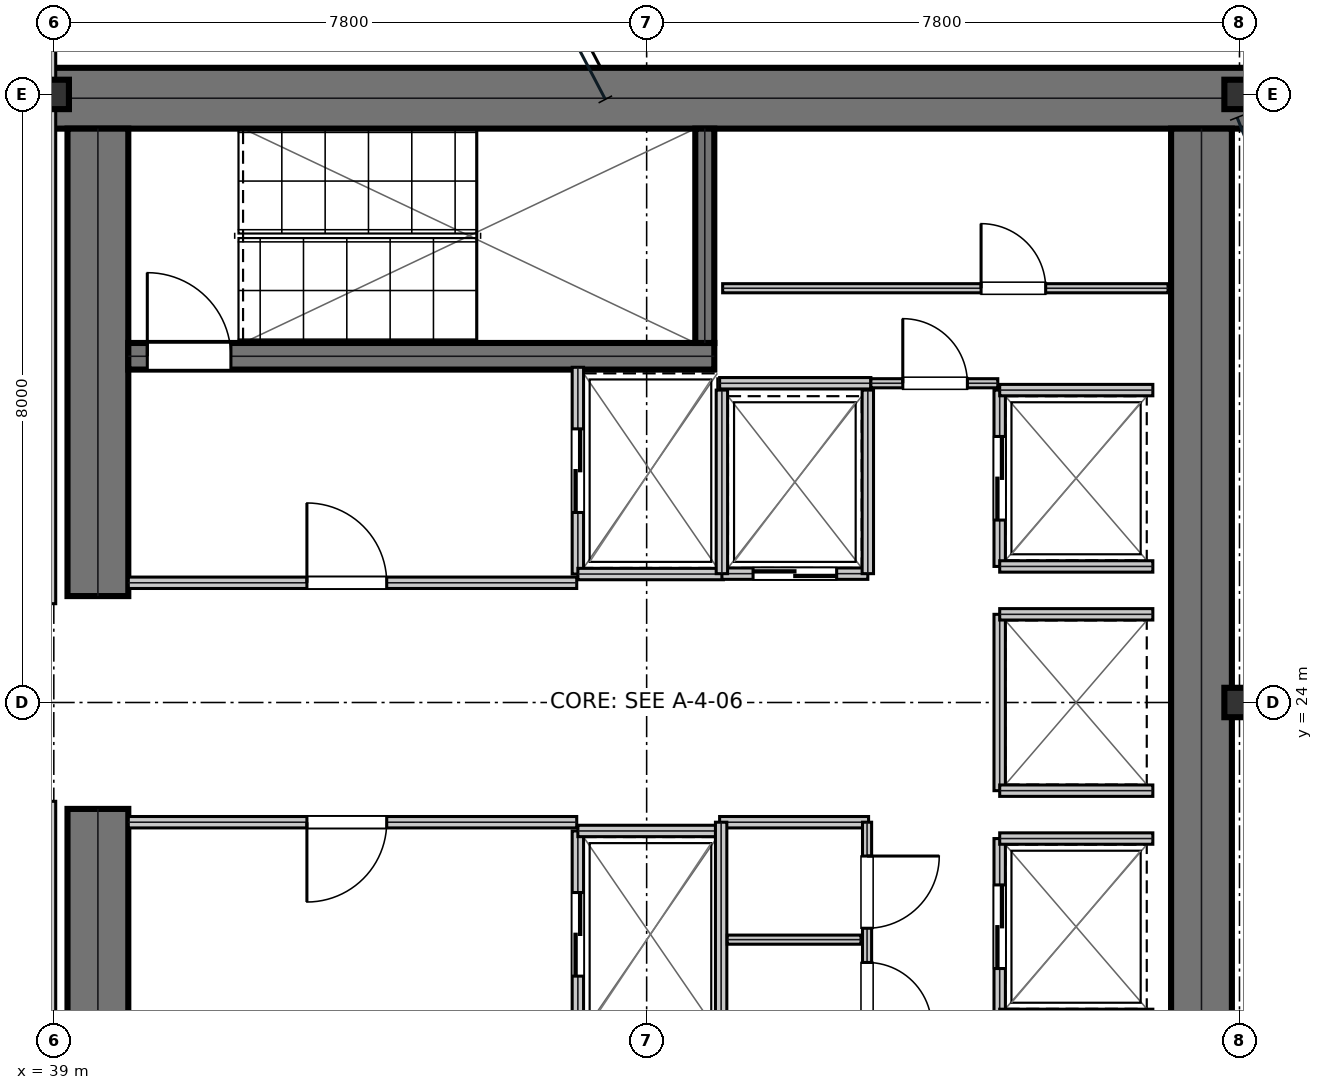
"""IFC4 building model, lengths in metres.
Left out: names, types, materials, properties, quantities, classifications, styles, units other than length and angle.
Written with IfcOpenShell. Run it as: python <this file> out.ifc"""

import sys

from ifc_helpers import new_model, si_unit, direction, frame, frame_2d, origin, origin_2d, place, context, subcontext, project, spatial, rectangle, i_section, extrude, element, fill, save


model = new_model("IFC4")
c1 = context("Model", 3, precision=1e-05, world=origin(), true_north=direction((0.0, 1.0)))
c2 = subcontext(c1, "Body", "Model", "MODEL_VIEW")
j1 = project(units=[si_unit("LENGTHUNIT", "METRE"), si_unit("PLANEANGLEUNIT", "RADIAN")], contexts=[c1])
p1 = place(None, origin())
s1 = spatial("IfcSite", under=j1, at=p1, CompositionType="ELEMENT")
p2 = place(p1, origin())
s2 = spatial("IfcBuilding", under=s1, at=p2, CompositionType="ELEMENT")
p3 = place(p2, frame((0.0, 0.0, 141.15)))
s3 = spatial("IfcBuildingStorey", under=s2, at=p3, CompositionType="ELEMENT", Elevation=141.15)
p4 = place(p3, frame((38.8, 31.95, 0.0), z_axis=(0.0, 0.0, 1.0), x_axis=(1.0, 0.0, 0.0)))
e1 = element("IfcWall", 1, at=p4, inside=s3, PredefinedType="SHEAR", context=c2, shape_type="SweptSolid", body=[
    extrude(rectangle(XDim=16.0, YDim=0.8, at=frame_2d((8.0, 0.0))), origin(), (0.0, 0.0, 1.0), 3.81),
])
for number, where, z_axis, x_axis in (
    (2, (39.58, 16.45, 0.0), (0.0, 0.0, 1.0), (0.0, 1.0, 0.0)),
    (3, (39.58, 25.4, 0.0), (0.0, 0.0, 1.0), (0.0, 1.0, 0.0)),
):
    element("IfcWall", number, at=place(p3, frame(where, z_axis=z_axis, x_axis=x_axis)), inside=s3, PredefinedType="SHEAR", context=c2, shape_type="SweptSolid", body=[
        extrude(rectangle(XDim=6.15, YDim=0.8, at=frame_2d((3.075, 0.0))), origin(), (0.0, 0.0, 1.0), 3.81),
    ])
p5 = place(p3, frame((54.1, 16.45, 0.0), z_axis=(0.0, 0.0, 1.0), x_axis=(0.0, 1.0, 0.0)))
e4 = element("IfcWall", 4, at=p5, inside=s3, PredefinedType="SHEAR", context=c2, shape_type="SweptSolid", body=[
    extrude(rectangle(XDim=15.1, YDim=0.8, at=frame_2d((7.55, 0.0))), origin(), (0.0, 0.0, 1.0), 3.81),
])
p6 = place(p3, frame((39.98, 28.555, 0.0), z_axis=(0.0, 0.0, 1.0), x_axis=(1.0, 0.0, 0.0)))
e5 = element("IfcWall", 5, at=p6, inside=s3, PredefinedType="SHEAR", context=c2, shape_type="SweptSolid", body=[
    extrude(rectangle(XDim=7.71, YDim=0.35, at=frame_2d((3.855, 0.0))), origin(), (0.0, 0.0, 1.0), 3.81),
])
p7 = place(p6, frame((0.25, 0.0, 0.0)))
e6 = element("IfcOpeningElement", 6, at=p7, cuts=e5, PredefinedType="OPENING", context=c2, shape_type="SweptSolid", body=[
    extrude(rectangle(XDim=1.1, YDim=2.15, at=frame_2d((0.55, 1.075))), frame((0.0, 0.185, 0.0), z_axis=(0.0, -1.0, 0.0), x_axis=(1.0, 0.0, 0.0)), (0.0, 0.0, 1.0), 0.37),
])
p8 = place(p3, frame((47.565, 28.73, 0.0), z_axis=(0.0, 0.0, 1.0), x_axis=(0.0, 1.0, 0.0)))
e7 = element("IfcWall", 7, at=p8, inside=s3, PredefinedType="SHEAR", context=c2, shape_type="SweptSolid", body=[
    extrude(rectangle(XDim=2.82, YDim=0.25, at=frame_2d((1.41, 0.0))), origin(), (0.0, 0.0, 1.0), 3.81),
])
for number, where, z_axis, x_axis in (
    (8, (39.0, 32.0, 0.0), (0.0, 0.0, 1.0), (1.0, 0.0, 0.0)),
    (9, (54.6, 24.0, 0.0), (0.0, 0.0, 1.0), (1.0, 0.0, 0.0)),
    (10, (54.6, 32.0, 0.0), (0.0, 0.0, 1.0), (1.0, 0.0, 0.0)),
):
    element("IfcColumn", number, at=place(p3, frame(where, z_axis=z_axis, x_axis=x_axis)), inside=s3, PredefinedType="COLUMN", context=c2, shape_type="SweptSolid", body=[
        extrude(i_section(OverallWidth=0.398, OverallDepth=0.387, WebThickness=0.021, FlangeThickness=0.033, at=origin_2d()), origin(), (0.0, 0.0, 1.0), 4.044),
    ])
p9 = place(p3, frame((39.98, 25.575, 0.0), z_axis=(0.0, 0.0, 1.0), x_axis=(1.0, 0.0, 0.0)))
e11 = element("IfcWall", 11, at=p9, inside=s3, PredefinedType="PARTITIONING", context=c2, shape_type="SweptSolid", body=[
    extrude(rectangle(XDim=5.9, YDim=0.15, at=frame_2d((2.95, 0.0))), origin(), (0.0, 0.0, 1.0), 3.81),
])
p10 = place(p9, frame((2.35, 0.0, 0.0)))
e12 = element("IfcOpeningElement", 12, at=p10, cuts=e11, PredefinedType="OPENING", context=c2, shape_type="SweptSolid", body=[
    extrude(rectangle(XDim=1.05, YDim=2.15, at=frame_2d((0.525, 1.075))), frame((0.0, 0.085, 0.0), z_axis=(0.0, -1.0, 0.0), x_axis=(1.0, 0.0, 0.0)), (0.0, 0.0, 1.0), 0.17),
])
p11 = place(p3, frame((39.98, 22.425, 0.0), z_axis=(0.0, 0.0, 1.0), x_axis=(1.0, 0.0, 0.0)))
e13 = element("IfcWall", 13, at=p11, inside=s3, PredefinedType="PARTITIONING", context=c2, shape_type="SweptSolid", body=[
    extrude(rectangle(XDim=5.9, YDim=0.15, at=frame_2d((2.95, 0.0))), origin(), (0.0, 0.0, 1.0), 3.81),
])
p12 = place(p11, frame((2.35, 0.0, 0.0)))
e14 = element("IfcOpeningElement", 14, at=p12, cuts=e13, PredefinedType="OPENING", context=c2, shape_type="SweptSolid", body=[
    extrude(rectangle(XDim=1.05, YDim=2.15, at=frame_2d((0.525, 1.075))), frame((0.0, 0.085, 0.0), z_axis=(0.0, -1.0, 0.0), x_axis=(1.0, 0.0, 0.0)), (0.0, 0.0, 1.0), 0.17),
])
p13 = place(p3, frame((45.895, 25.69, 0.0), z_axis=(0.0, 0.0, 1.0), x_axis=(0.0, 1.0, 0.0)))
e15 = element("IfcWall", 15, at=p13, inside=s3, PredefinedType="PARTITIONING", context=c2, shape_type="SweptSolid", body=[
    extrude(rectangle(XDim=2.72, YDim=0.15, at=frame_2d((1.36, 0.0))), origin(), (0.0, 0.0, 1.0), 3.81),
])
p14 = place(p13, frame((0.81, 0.0, 0.0)))
e16 = element("IfcOpeningElement", 16, at=p14, cuts=e15, PredefinedType="OPENING", context=c2, shape_type="SweptSolid", body=[
    extrude(rectangle(XDim=1.1, YDim=2.15, at=frame_2d((0.55, 1.075))), frame((0.0, 0.085, 0.0), z_axis=(0.0, -1.0, 0.0), x_axis=(1.0, 0.0, 0.0)), (0.0, 0.0, 1.0), 0.17),
])
p15 = place(p3, frame((45.895, 25.69, 0.0), z_axis=(0.0, 0.0, 1.0), x_axis=(1.0, 0.0, 0.0)))
e17 = element("IfcWall", 17, at=p15, inside=s3, PredefinedType="PARTITIONING", context=c2, shape_type="SweptSolid", body=[
    extrude(rectangle(XDim=1.915, YDim=0.15, at=frame_2d((0.958, 0.0))), origin(), (0.0, 0.0, 1.0), 3.81),
])
p16 = place(p3, frame((45.895, 19.59, 0.0), z_axis=(0.0, 0.0, 1.0), x_axis=(0.0, 1.0, 0.0)))
e18 = element("IfcWall", 18, at=p16, inside=s3, PredefinedType="PARTITIONING", context=c2, shape_type="SweptSolid", body=[
    extrude(rectangle(XDim=2.72, YDim=0.15, at=frame_2d((1.36, 0.0))), origin(), (0.0, 0.0, 1.0), 3.81),
])
p17 = place(p16, frame((0.81, 0.0, 0.0)))
e19 = element("IfcOpeningElement", 19, at=p17, cuts=e18, PredefinedType="OPENING", context=c2, shape_type="SweptSolid", body=[
    extrude(rectangle(XDim=1.1, YDim=2.15, at=frame_2d((0.55, 1.075))), frame((0.0, 0.085, 0.0), z_axis=(0.0, -1.0, 0.0), x_axis=(1.0, 0.0, 0.0)), (0.0, 0.0, 1.0), 0.17),
])
p18 = place(p3, frame((45.895, 22.31, 0.0), z_axis=(0.0, 0.0, 1.0), x_axis=(1.0, 0.0, 0.0)))
e20 = element("IfcWall", 20, at=p18, inside=s3, PredefinedType="PARTITIONING", context=c2, shape_type="SweptSolid", body=[
    extrude(rectangle(XDim=1.915, YDim=0.15, at=frame_2d((0.958, 0.0))), origin(), (0.0, 0.0, 1.0), 3.81),
])
p19 = place(p3, frame((47.79, 25.695, 0.0), z_axis=(0.0, 0.0, 1.0), x_axis=(1.0, 0.0, 0.0)))
e21 = element("IfcWall", 21, at=p19, inside=s3, PredefinedType="PARTITIONING", context=c2, shape_type="SweptSolid", body=[
    extrude(rectangle(XDim=1.92, YDim=0.15, at=frame_2d((0.96, 0.0))), origin(), (0.0, 0.0, 1.0), 3.81),
])
p20 = place(p19, frame((0.41, 0.0, 0.0)))
e22 = element("IfcOpeningElement", 22, at=p20, cuts=e21, PredefinedType="OPENING", context=c2, shape_type="SweptSolid", body=[
    extrude(rectangle(XDim=1.1, YDim=2.15, at=frame_2d((0.55, 1.075))), frame((0.0, 0.085, 0.0), z_axis=(0.0, -1.0, 0.0), x_axis=(1.0, 0.0, 0.0)), (0.0, 0.0, 1.0), 0.17),
])
for number, where, z_axis, x_axis in (
    (23, (47.79, 25.695, 0.0), (0.0, 0.0, 1.0), (0.0, 1.0, 0.0)),
    (24, (49.71, 25.695, 0.0), (0.0, 0.0, 1.0), (0.0, 1.0, 0.0)),
):
    element("IfcWall", number, at=place(p3, frame(where, z_axis=z_axis, x_axis=x_axis)), inside=s3, PredefinedType="PARTITIONING", context=c2, shape_type="SweptSolid", body=[
        extrude(rectangle(XDim=2.415, YDim=0.15, at=frame_2d((1.208, 0.0))), origin(), (0.0, 0.0, 1.0), 3.81),
    ])
p21 = place(p3, frame((51.445, 25.79, 0.0), z_axis=(0.0, 0.0, 1.0), x_axis=(0.0, 1.0, 0.0)))
e25 = element("IfcWall", 25, at=p21, inside=s3, PredefinedType="PARTITIONING", context=c2, shape_type="SweptSolid", body=[
    extrude(rectangle(XDim=2.32, YDim=0.15, at=frame_2d((1.16, 0.0))), origin(), (0.0, 0.0, 1.0), 3.81),
])
p22 = place(p21, frame((0.61, 0.0, 0.0)))
e26 = element("IfcOpeningElement", 26, at=p22, cuts=e25, PredefinedType="OPENING", context=c2, shape_type="SweptSolid", body=[
    extrude(rectangle(XDim=1.1, YDim=2.15, at=frame_2d((0.55, 1.075))), frame((0.0, 0.085, 0.0), z_axis=(0.0, -1.0, 0.0), x_axis=(1.0, 0.0, 0.0)), (0.0, 0.0, 1.0), 0.17),
])
for number, where, z_axis, x_axis in (
    (27, (51.445, 25.79, 0.0), (0.0, 0.0, 1.0), (1.0, 0.0, 0.0)),
    (28, (51.445, 28.11, 0.0), (0.0, 0.0, 1.0), (1.0, 0.0, 0.0)),
):
    element("IfcWall", number, at=place(p3, frame(where, z_axis=z_axis, x_axis=x_axis)), inside=s3, PredefinedType="PARTITIONING", context=c2, shape_type="SweptSolid", body=[
        extrude(rectangle(XDim=2.015, YDim=0.15, at=frame_2d((1.007, 0.0))), origin(), (0.0, 0.0, 1.0), 3.81),
    ])
p23 = place(p3, frame((51.445, 19.89, 0.0), z_axis=(0.0, 0.0, 1.0), x_axis=(0.0, 1.0, 0.0)))
e29 = element("IfcWall", 29, at=p23, inside=s3, PredefinedType="PARTITIONING", context=c2, shape_type="SweptSolid", body=[
    extrude(rectangle(XDim=2.32, YDim=0.15, at=frame_2d((1.16, 0.0))), origin(), (0.0, 0.0, 1.0), 3.81),
])
p24 = place(p23, frame((0.61, 0.0, 0.0)))
e30 = element("IfcOpeningElement", 30, at=p24, cuts=e29, PredefinedType="OPENING", context=c2, shape_type="SweptSolid", body=[
    extrude(rectangle(XDim=1.1, YDim=2.15, at=frame_2d((0.55, 1.075))), frame((0.0, 0.085, 0.0), z_axis=(0.0, -1.0, 0.0), x_axis=(1.0, 0.0, 0.0)), (0.0, 0.0, 1.0), 0.17),
])
for number, where, z_axis, x_axis in (
    (31, (51.445, 19.89, 0.0), (0.0, 0.0, 1.0), (1.0, 0.0, 0.0)),
    (32, (51.445, 22.21, 0.0), (0.0, 0.0, 1.0), (1.0, 0.0, 0.0)),
):
    element("IfcWall", number, at=place(p3, frame(where, z_axis=z_axis, x_axis=x_axis)), inside=s3, PredefinedType="PARTITIONING", context=c2, shape_type="SweptSolid", body=[
        extrude(rectangle(XDim=2.015, YDim=0.15, at=frame_2d((1.007, 0.0))), origin(), (0.0, 0.0, 1.0), 3.81),
    ])
p25 = place(p3, frame((51.445, 22.84, 0.0), z_axis=(0.0, 0.0, 1.0), x_axis=(0.0, 1.0, 0.0)))
e33 = element("IfcWall", 33, at=p25, inside=s3, PredefinedType="PARTITIONING", context=c2, shape_type="SweptSolid", body=[
    extrude(rectangle(XDim=2.32, YDim=0.15, at=frame_2d((1.16, 0.0))), origin(), (0.0, 0.0, 1.0), 3.81),
])
for number, where, z_axis, x_axis in (
    (34, (51.445, 22.84, 0.0), (0.0, 0.0, 1.0), (1.0, 0.0, 0.0)),
    (35, (51.445, 25.16, 0.0), (0.0, 0.0, 1.0), (1.0, 0.0, 0.0)),
):
    element("IfcWall", number, at=place(p3, frame(where, z_axis=z_axis, x_axis=x_axis)), inside=s3, PredefinedType="PARTITIONING", context=c2, shape_type="SweptSolid", body=[
        extrude(rectangle(XDim=2.015, YDim=0.15, at=frame_2d((1.007, 0.0))), origin(), (0.0, 0.0, 1.0), 3.81),
    ])
p26 = place(p3, frame((47.76, 22.425, 0.0), z_axis=(0.0, 0.0, 1.0), x_axis=(1.0, 0.0, 0.0)))
e36 = element("IfcWall", 36, at=p26, inside=s3, PredefinedType="PARTITIONING", context=c2, shape_type="SweptSolid", body=[
    extrude(rectangle(XDim=1.96, YDim=0.15, at=frame_2d((0.98, 0.0))), origin(), (0.0, 0.0, 1.0), 3.81),
])
p27 = place(p3, frame((47.78, 16.45, 0.0), z_axis=(0.0, 0.0, 1.0), x_axis=(0.0, 1.0, 0.0)))
e37 = element("IfcWall", 37, at=p27, inside=s3, PredefinedType="PARTITIONING", context=c2, shape_type="SweptSolid", body=[
    extrude(rectangle(XDim=5.975, YDim=0.15, at=frame_2d((2.988, 0.0))), origin(), (0.0, 0.0, 1.0), 3.81),
])
p28 = place(p3, frame((47.86, 20.88, 0.0), z_axis=(0.0, 0.0, 1.0), x_axis=(1.0, 0.0, 0.0)))
e38 = element("IfcWall", 38, at=p28, inside=s3, PredefinedType="PARTITIONING", context=c2, shape_type="SweptSolid", body=[
    extrude(rectangle(XDim=1.76, YDim=0.12, at=frame_2d((0.88, 0.0))), origin(), (0.0, 0.0, 1.0), 3.81),
])
p29 = place(p3, frame((49.7, 16.48, 0.0), z_axis=(0.0, 0.0, 1.0), x_axis=(0.0, 1.0, 0.0)))
e39 = element("IfcWall", 39, at=p29, inside=s3, PredefinedType="PARTITIONING", context=c2, shape_type="SweptSolid", body=[
    extrude(rectangle(XDim=5.945, YDim=0.12, at=frame_2d((2.973, 0.0))), origin(), (0.0, 0.0, 1.0), 3.81),
])
p30 = place(p29, frame((1.6, 0.0, 0.0)))
e40 = element("IfcOpeningElement", 40, at=p30, cuts=e39, PredefinedType="OPENING", context=c2, shape_type="SweptSolid", body=[
    extrude(rectangle(XDim=0.85, YDim=2.15, at=frame_2d((0.425, 1.075))), frame((0.0, 0.07, 0.0), z_axis=(0.0, -1.0, 0.0), x_axis=(1.0, 0.0, 0.0)), (0.0, 0.0, 1.0), 0.14),
])
p31 = place(p29, frame((3.25, 0.0, 0.0)))
e41 = element("IfcOpeningElement", 41, at=p31, cuts=e39, PredefinedType="OPENING", context=c2, shape_type="SweptSolid", body=[
    extrude(rectangle(XDim=0.85, YDim=2.15, at=frame_2d((0.425, 1.075))), frame((0.0, 0.07, 0.0), z_axis=(0.0, -1.0, 0.0), x_axis=(1.0, 0.0, 0.0)), (0.0, 0.0, 1.0), 0.14),
])
p32 = place(p29, frame((4.55, 0.0, 0.0)))
e42 = element("IfcOpeningElement", 42, at=p32, cuts=e39, PredefinedType="OPENING", context=c2, shape_type="SweptSolid", body=[
    extrude(rectangle(XDim=0.95, YDim=2.15, at=frame_2d((0.475, 1.075))), frame((0.0, 0.07, 0.0), z_axis=(0.0, -1.0, 0.0), x_axis=(1.0, 0.0, 0.0)), (0.0, 0.0, 1.0), 0.14),
])
p33 = place(p3, frame((47.76, 28.2, 0.0), z_axis=(0.0, 0.0, 1.0), x_axis=(1.0, 0.0, 0.0)))
e43 = element("IfcWall", 43, at=p33, inside=s3, PredefinedType="PARTITIONING", context=c2, shape_type="SweptSolid", body=[
    extrude(rectangle(XDim=1.99, YDim=0.15, at=frame_2d((0.995, 0.0))), origin(), (0.0, 0.0, 1.0), 3.81),
])
p34 = place(p3, frame((49.75, 28.2, 0.0), z_axis=(0.0, 0.0, 1.0), x_axis=(1.0, 0.0, 0.0)))
e44 = element("IfcWall", 44, at=p34, inside=s3, PredefinedType="PARTITIONING", context=c2, shape_type="SweptSolid", body=[
    extrude(rectangle(XDim=1.67, YDim=0.12, at=frame_2d((0.835, 0.0))), origin(), (0.0, 0.0, 1.0), 3.81),
])
p35 = place(p34, frame((0.42, 0.0, 0.0)))
e45 = element("IfcOpeningElement", 45, at=p35, cuts=e44, PredefinedType="OPENING", context=c2, shape_type="SweptSolid", body=[
    extrude(rectangle(XDim=0.85, YDim=2.15, at=frame_2d((0.425, 1.075))), frame((0.0, 0.07, 0.0), z_axis=(0.0, -1.0, 0.0), x_axis=(1.0, 0.0, 0.0)), (0.0, 0.0, 1.0), 0.14),
])
p36 = place(p3, frame((47.8, 29.45, 0.0), z_axis=(0.0, 0.0, 1.0), x_axis=(1.0, 0.0, 0.0)))
e46 = element("IfcWall", 46, at=p36, inside=s3, PredefinedType="PARTITIONING", context=c2, shape_type="SweptSolid", body=[
    extrude(rectangle(XDim=5.86, YDim=0.12, at=frame_2d((2.93, 0.0))), origin(), (0.0, 0.0, 1.0), 3.81),
])
p37 = place(p36, frame((3.4, 0.0, 0.0)))
e47 = element("IfcOpeningElement", 47, at=p37, cuts=e46, PredefinedType="OPENING", context=c2, shape_type="SweptSolid", body=[
    extrude(rectangle(XDim=0.85, YDim=2.15, at=frame_2d((0.425, 1.075))), frame((0.0, 0.07, 0.0), z_axis=(0.0, -1.0, 0.0), x_axis=(1.0, 0.0, 0.0)), (0.0, 0.0, 1.0), 0.14),
])
for number, where, z_axis, x_axis in (
    (48, (38.95, 14.5, 0.0), (0.0, 0.0, 1.0), (0.0, 1.0, 0.0)),
    (49, (38.95, 25.3, 0.0), (0.0, 0.0, 1.0), (0.0, 1.0, 0.0)),
):
    element("IfcWall", number, at=place(p3, frame(where, z_axis=z_axis, x_axis=x_axis)), inside=s3, PredefinedType="PARTITIONING", context=c2, shape_type="SweptSolid", body=[
        extrude(rectangle(XDim=8.2, YDim=0.15, at=frame_2d((4.1, 0.0))), origin(), (0.0, 0.0, 1.0), 3.19),
    ])
p38 = place(p10, origin())
e50 = element("IfcDoor", 50, at=p38, inside=s3, OperationType="SINGLE_SWING_LEFT", PredefinedType="DOOR", context=c2, shape_type="SweptSolid", body=[
    extrude(rectangle(XDim=1.05, YDim=2.15, at=frame_2d((0.525, 1.075))), frame((0.0, 0.025, 0.0), z_axis=(0.0, -1.0, 0.0), x_axis=(1.0, 0.0, 0.0)), (0.0, 0.0, 1.0), 0.05),
])
fill(e12, e50)
p39 = place(p12, frame((1.05, 0.0, 0.0), z_axis=(0.0, 0.0, 1.0), x_axis=(-1.0, 0.0, 0.0)))
e51 = element("IfcDoor", 51, at=p39, inside=s3, OperationType="SINGLE_SWING_RIGHT", PredefinedType="DOOR", context=c2, shape_type="SweptSolid", body=[
    extrude(rectangle(XDim=1.05, YDim=2.15, at=frame_2d((0.525, 1.075))), frame((0.0, 0.025, 0.0), z_axis=(0.0, -1.0, 0.0), x_axis=(1.0, 0.0, 0.0)), (0.0, 0.0, 1.0), 0.05),
])
fill(e14, e51)
p40 = place(p14, frame((1.1, 0.0, 0.0), z_axis=(0.0, 0.0, 1.0), x_axis=(-1.0, 0.0, 0.0)))
e52 = element("IfcDoor", 52, at=p40, inside=s3, OperationType="DOUBLE_DOOR_SLIDING", PredefinedType="DOOR", context=c2, shape_type="SweptSolid", body=[
    extrude(rectangle(XDim=1.1, YDim=2.15, at=frame_2d((0.55, 1.075))), frame((0.0, 0.025, 0.0), z_axis=(0.0, -1.0, 0.0), x_axis=(1.0, 0.0, 0.0)), (0.0, 0.0, 1.0), 0.05),
])
fill(e16, e52)
p41 = place(p17, frame((1.1, 0.0, 0.0), z_axis=(0.0, 0.0, 1.0), x_axis=(-1.0, 0.0, 0.0)))
e53 = element("IfcDoor", 53, at=p41, inside=s3, OperationType="DOUBLE_DOOR_SLIDING", PredefinedType="DOOR", context=c2, shape_type="SweptSolid", body=[
    extrude(rectangle(XDim=1.1, YDim=2.15, at=frame_2d((0.55, 1.075))), frame((0.0, 0.025, 0.0), z_axis=(0.0, -1.0, 0.0), x_axis=(1.0, 0.0, 0.0)), (0.0, 0.0, 1.0), 0.05),
])
fill(e19, e53)
p42 = place(p20, frame((1.1, 0.0, 0.0), z_axis=(0.0, 0.0, 1.0), x_axis=(-1.0, 0.0, 0.0)))
e54 = element("IfcDoor", 54, at=p42, inside=s3, OperationType="DOUBLE_DOOR_SLIDING", PredefinedType="DOOR", context=c2, shape_type="SweptSolid", body=[
    extrude(rectangle(XDim=1.1, YDim=2.15, at=frame_2d((0.55, 1.075))), frame((0.0, 0.025, 0.0), z_axis=(0.0, -1.0, 0.0), x_axis=(1.0, 0.0, 0.0)), (0.0, 0.0, 1.0), 0.05),
])
fill(e22, e54)
p43 = place(p22, frame((1.1, 0.0, 0.0), z_axis=(0.0, 0.0, 1.0), x_axis=(-1.0, 0.0, 0.0)))
e55 = element("IfcDoor", 55, at=p43, inside=s3, OperationType="DOUBLE_DOOR_SLIDING", PredefinedType="DOOR", context=c2, shape_type="SweptSolid", body=[
    extrude(rectangle(XDim=1.1, YDim=2.15, at=frame_2d((0.55, 1.075))), frame((0.0, 0.025, 0.0), z_axis=(0.0, -1.0, 0.0), x_axis=(1.0, 0.0, 0.0)), (0.0, 0.0, 1.0), 0.05),
])
fill(e26, e55)
p44 = place(p24, frame((1.1, 0.0, 0.0), z_axis=(0.0, 0.0, 1.0), x_axis=(-1.0, 0.0, 0.0)))
e56 = element("IfcDoor", 56, at=p44, inside=s3, OperationType="DOUBLE_DOOR_SLIDING", PredefinedType="DOOR", context=c2, shape_type="SweptSolid", body=[
    extrude(rectangle(XDim=1.1, YDim=2.15, at=frame_2d((0.55, 1.075))), frame((0.0, 0.025, 0.0), z_axis=(0.0, -1.0, 0.0), x_axis=(1.0, 0.0, 0.0)), (0.0, 0.0, 1.0), 0.05),
])
fill(e30, e56)
p45 = place(p31, frame((0.85, 0.0, 0.0), z_axis=(0.0, 0.0, 1.0), x_axis=(-1.0, 0.0, 0.0)))
e57 = element("IfcDoor", 57, at=p45, inside=s3, OperationType="SINGLE_SWING_RIGHT", PredefinedType="DOOR", context=c2, shape_type="SweptSolid", body=[
    extrude(rectangle(XDim=0.85, YDim=2.15, at=frame_2d((0.425, 1.075))), frame((0.0, 0.025, 0.0), z_axis=(0.0, -1.0, 0.0), x_axis=(1.0, 0.0, 0.0)), (0.0, 0.0, 1.0), 0.05),
])
fill(e41, e57)
p46 = place(p32, frame((0.95, 0.0, 0.0), z_axis=(0.0, 0.0, 1.0), x_axis=(-1.0, 0.0, 0.0)))
e58 = element("IfcDoor", 58, at=p46, inside=s3, OperationType="SINGLE_SWING_LEFT", PredefinedType="DOOR", context=c2, shape_type="SweptSolid", body=[
    extrude(rectangle(XDim=0.95, YDim=2.15, at=frame_2d((0.475, 1.075))), frame((0.0, 0.025, 0.0), z_axis=(0.0, -1.0, 0.0), x_axis=(1.0, 0.0, 0.0)), (0.0, 0.0, 1.0), 0.05),
])
fill(e42, e58)
p47 = place(p35, origin())
e59 = element("IfcDoor", 59, at=p47, inside=s3, OperationType="SINGLE_SWING_LEFT", PredefinedType="DOOR", context=c2, shape_type="SweptSolid", body=[
    extrude(rectangle(XDim=0.85, YDim=2.15, at=frame_2d((0.425, 1.075))), frame((0.0, 0.025, 0.0), z_axis=(0.0, -1.0, 0.0), x_axis=(1.0, 0.0, 0.0)), (0.0, 0.0, 1.0), 0.05),
])
fill(e45, e59)
p48 = place(p37, origin())
e60 = element("IfcDoor", 60, at=p48, inside=s3, OperationType="SINGLE_SWING_LEFT", PredefinedType="DOOR", context=c2, shape_type="SweptSolid", body=[
    extrude(rectangle(XDim=0.85, YDim=2.15, at=frame_2d((0.425, 1.075))), frame((0.0, 0.025, 0.0), z_axis=(0.0, -1.0, 0.0), x_axis=(1.0, 0.0, 0.0)), (0.0, 0.0, 1.0), 0.05),
])
fill(e47, e60)
p49 = place(p7, origin())
e61 = element("IfcDoor", 61, at=p49, inside=s3, OperationType="SINGLE_SWING_LEFT", PredefinedType="DOOR", context=c2, shape_type="SweptSolid", body=[
    extrude(rectangle(XDim=1.1, YDim=2.15, at=frame_2d((0.55, 1.075))), frame((0.0, 0.025, 0.0), z_axis=(0.0, -1.0, 0.0), x_axis=(1.0, 0.0, 0.0)), (0.0, 0.0, 1.0), 0.05),
])
fill(e6, e61)
save(model, sys.argv[1])
